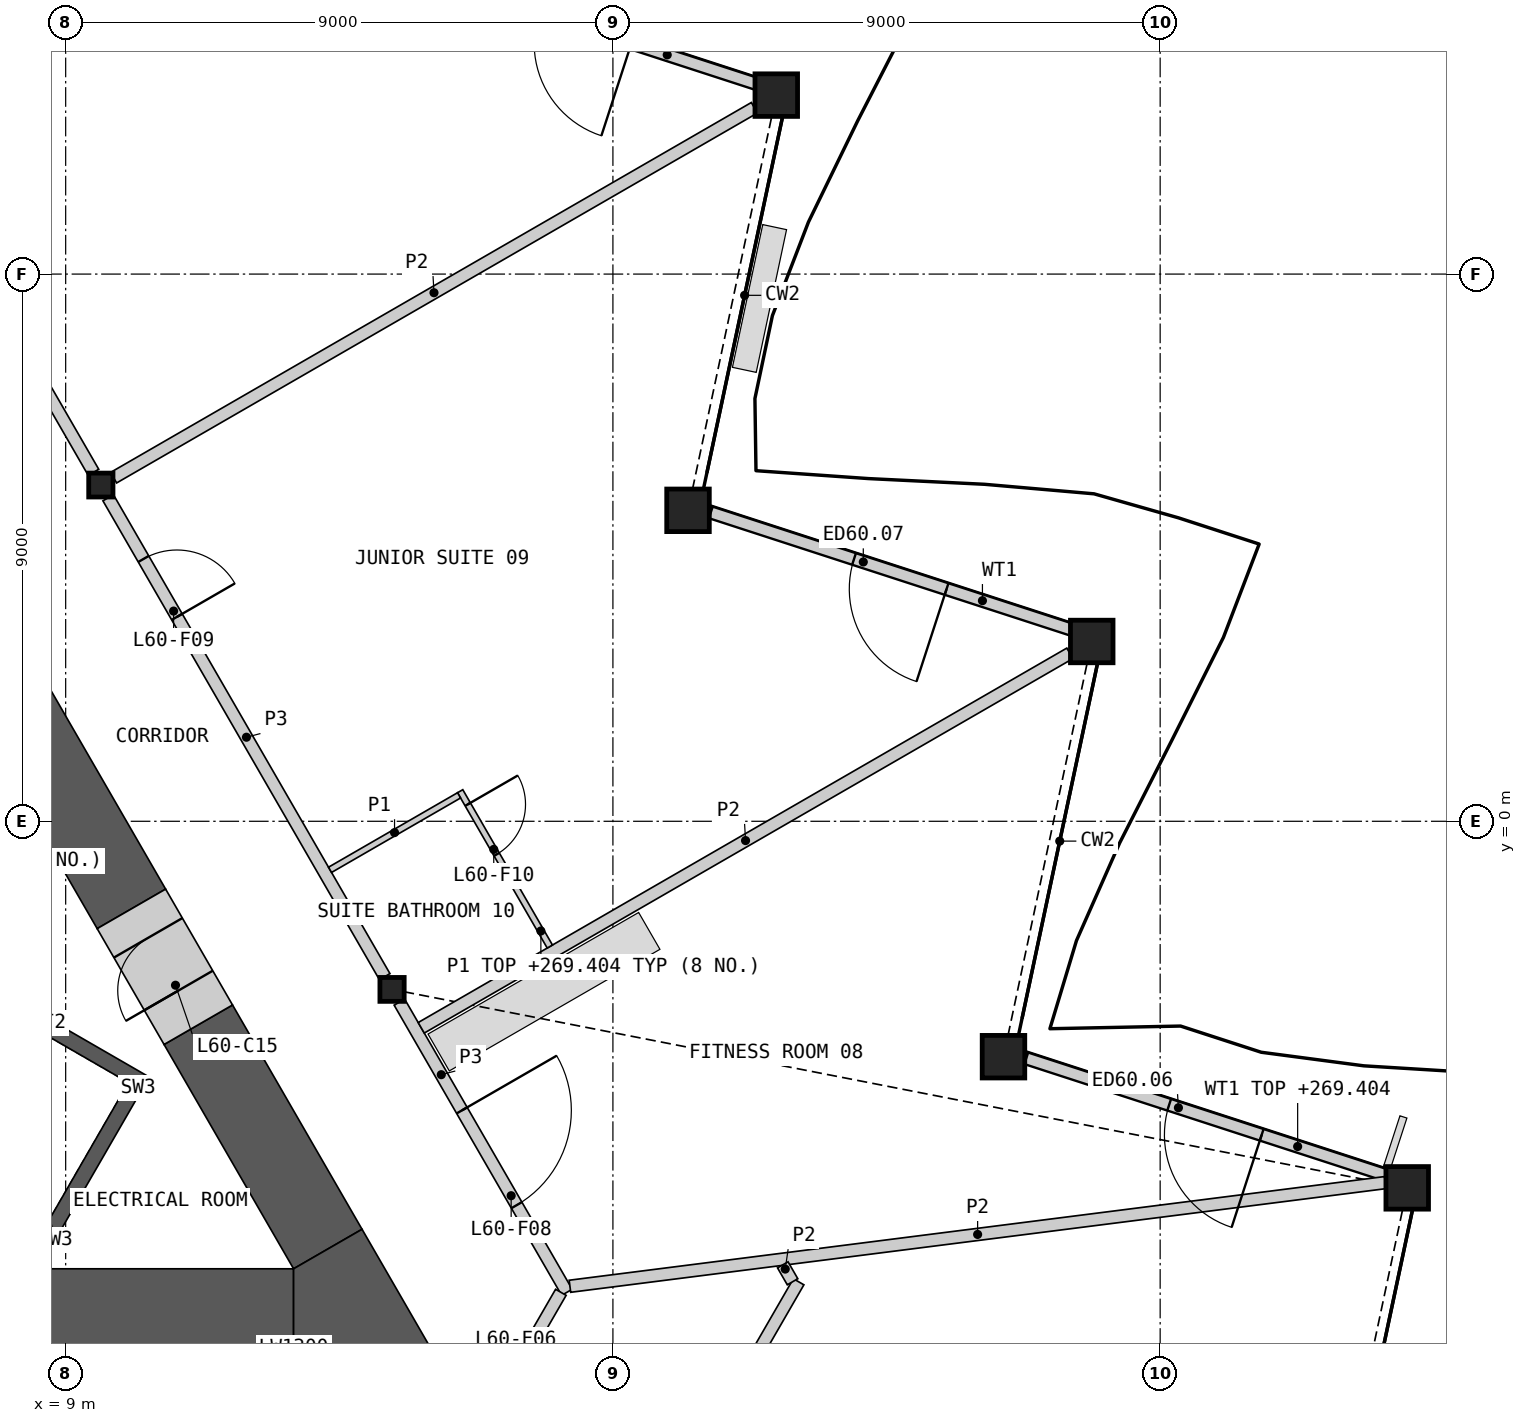
"""IFC4 building model, lengths in metres.
Left out: names, types, materials, properties, quantities, classifications, styles, units other than length and angle.
Written with IfcOpenShell. Run it as: python <this file> out.ifc"""

import sys

from ifc_helpers import new_model, si_unit, direction, frame, frame_2d, origin, origin_2d, place, context, subcontext, project, spatial, polyline, rectangle, hollow_rectangle, i_section, outline, extrude, element, fill, save


model = new_model("IFC4")
c1 = context("Model", 3, precision=1e-05, world=origin(), true_north=direction((0.0, 1.0)))
c2 = subcontext(c1, "Body", "Model", "MODEL_VIEW")
j1 = project(units=[si_unit("LENGTHUNIT", "METRE"), si_unit("PLANEANGLEUNIT", "RADIAN")], contexts=[c1])
p1 = place(None, origin())
s1 = spatial("IfcSite", under=j1, at=p1, CompositionType="ELEMENT")
p2 = place(p1, origin())
s2 = spatial("IfcBuilding", under=s1, at=p2, CompositionType="ELEMENT")
p3 = place(p2, frame((0.0, 0.0, 267.0)))
s3 = spatial("IfcBuildingStorey", under=s2, at=p3, CompositionType="ELEMENT", Elevation=267.0)
for number, where, z_axis, x_axis in (
    (1, (31.063, -6.029, 0.0), (0.0, 0.0, 1.0), (1.0, 0.0, 0.0)),
    (2, (24.423, -3.872, 0.0), (0.0, 0.0, 1.0), (1.0, 0.0, 0.0)),
    (3, (25.875, 2.957, 0.0), (0.0, 0.0, 1.0), (1.0, 0.0, 0.0)),
    (4, (19.235, 5.115, 0.0), (0.0, 0.0, 1.0), (1.0, 0.0, 0.0)),
    (5, (20.687, 11.943, 0.0), (0.0, 0.0, 1.0), (1.0, 0.0, 0.0)),
):
    element("IfcColumn", number, at=place(p3, frame(where, z_axis=z_axis, x_axis=x_axis)), inside=s3, PredefinedType="COLUMN", context=c2, shape_type="SweptSolid", body=[
        extrude(hollow_rectangle(XDim=0.7, YDim=0.7, WallThickness=0.045, at=origin_2d()), origin(), (0.0, 0.0, 1.0), 3.6),
    ])
for number, where, z_axis, x_axis in (
    (6, (14.368, -2.765, 0.0), (0.0, 0.0, 1.0), (1.0, 0.0, 0.0)),
    (7, (9.578, 5.53, 0.0), (0.0, 0.0, 1.0), (1.0, 0.0, 0.0)),
):
    element("IfcColumn", number, at=place(p3, frame(where, z_axis=z_axis, x_axis=x_axis)), inside=s3, PredefinedType="COLUMN", context=c2, shape_type="SweptSolid", body=[
        extrude(i_section(OverallWidth=0.399, OverallDepth=0.393, WebThickness=0.023, FlangeThickness=0.037, at=origin_2d()), origin(), (0.0, 0.0, 1.0), 3.6),
    ])
p4 = place(p3, frame((30.749, -5.832, 0.0), z_axis=(0.0, 0.0, 1.0), x_axis=(-0.95105557136, 0.309019902571, 0.0)))
e8 = element("IfcWall", 8, at=p4, inside=s3, PredefinedType="SOLIDWALL", context=c2, shape_type="SweptSolid", body=[
    extrude(rectangle(XDim=6.257, YDim=0.2, at=frame_2d((3.128, 0.0))), origin(), (0.0, 0.0, 1.0), 2.404),
])
p5 = place(p4, frame((2.186, 0.0, 0.0)))
e9 = element("IfcOpeningElement", 9, at=p5, cuts=e8, PredefinedType="OPENING", context=c2, shape_type="SweptSolid", body=[
    extrude(rectangle(XDim=1.6, YDim=2.4, at=frame_2d((0.8, 1.2))), frame((0.0, 0.11, 0.0), z_axis=(0.0, -1.0, 0.0), x_axis=(1.0, 0.0, 0.0)), (0.0, 0.0, 1.0), 0.22),
])
p6 = place(p3, frame((25.566, 3.145, 0.0), z_axis=(0.0, 0.0, 1.0), x_axis=(-0.951057270474, 0.309014673241, 0.0)))
e10 = element("IfcWall", 10, at=p6, inside=s3, PredefinedType="SOLIDWALL", context=c2, shape_type="SweptSolid", body=[
    extrude(rectangle(XDim=6.263, YDim=0.2, at=frame_2d((3.131, 0.0))), origin(), (0.0, 0.0, 1.0), 2.701),
])
p7 = place(p6, frame((2.186, 0.0, 0.0)))
e11 = element("IfcOpeningElement", 11, at=p7, cuts=e10, PredefinedType="OPENING", context=c2, shape_type="SweptSolid", body=[
    extrude(rectangle(XDim=1.6, YDim=2.4, at=frame_2d((0.8, 1.2))), frame((0.0, 0.11, 0.0), z_axis=(0.0, -1.0, 0.0), x_axis=(1.0, 0.0, 0.0)), (0.0, 0.0, 1.0), 0.22),
])
p8 = place(p3, frame((20.384, 12.121, 0.0), z_axis=(0.0, 0.0, 1.0), x_axis=(-0.951051239427, 0.309033234433, 0.0)))
e12 = element("IfcWall", 12, at=p8, inside=s3, PredefinedType="SOLIDWALL", context=c2, shape_type="SweptSolid", body=[
    extrude(rectangle(XDim=6.269, YDim=0.2, at=frame_2d((3.134, 0.0))), origin(), (0.0, 0.0, 1.0), 2.701),
])
p9 = place(p8, frame((2.186, 0.0, 0.0)))
e13 = element("IfcOpeningElement", 13, at=p9, cuts=e12, PredefinedType="OPENING", context=c2, shape_type="SweptSolid", body=[
    extrude(rectangle(XDim=1.6, YDim=2.4, at=frame_2d((0.8, 1.2))), frame((0.0, 0.11, 0.0), z_axis=(0.0, -1.0, 0.0), x_axis=(1.0, 0.0, 0.0)), (0.0, 0.0, 1.0), 0.22),
])
p10 = place(p3, origin())
e14 = element("IfcWall", 14, at=p10, inside=s3, PredefinedType="SHEAR", context=c2, shape_type="SweptSolid", body=[
    extrude(outline(polyline([(3.763, -3.956), (8.83, -6.881), (8.738, -6.539), (3.888, -3.739), (3.763, -3.956)])), origin(), (0.0, 0.0, 1.0), 3.25),
])
p11 = place(p3, origin())
e15 = element("IfcWall", 15, at=p11, inside=s3, PredefinedType="SHEAR", context=c2, shape_type="SweptSolid", body=[
    extrude(outline(polyline([(8.83, -6.881), (10.374, -4.206), (10.032, -4.298), (8.738, -6.539), (8.83, -6.881)])), origin(), (0.0, 0.0, 1.0), 3.25),
])
p12 = place(p3, origin())
e16 = element("IfcWall", 16, at=p12, inside=s3, PredefinedType="SHEAR", context=c2, shape_type="SweptSolid", body=[
    extrude(outline(polyline([(10.032, -4.298), (10.374, -4.206), (5.307, -1.281), (5.182, -1.498), (10.032, -4.298)])), origin(), (0.0, 0.0, 1.0), 3.25),
])
p13 = place(p3, frame((-12.748, -8.01, 0.0), z_axis=(0.0, 0.0, 1.0), x_axis=(1.0, 0.0, 0.0)))
e17 = element("IfcWall", 17, at=p13, inside=s3, PredefinedType="SHEAR", context=c2, shape_type="SweptSolid", body=[
    extrude(rectangle(XDim=25.497, YDim=1.3, at=frame_2d((12.748, 0.0))), origin(), (0.0, 0.0, 1.0), 3.25),
])
p14 = place(p3, frame((10.081, -1.441, 0.0), z_axis=(0.0, 0.0, 1.0), x_axis=(-0.500012180433, 0.866018371294, 0.0)))
e18 = element("IfcWall", 18, at=p14, inside=s3, PredefinedType="SHEAR", context=c2, shape_type="SweptSolid", body=[
    extrude(rectangle(XDim=15.05, YDim=1.3, at=frame_2d((7.525, 0.0))), origin(), (0.0, 0.0, 1.0), 3.25),
])
p15 = place(p3, frame((13.311, -7.035, 0.0), z_axis=(0.0, 0.0, 1.0), x_axis=(-0.500003555838, 0.866023350811, 0.0)))
e19 = element("IfcWall", 19, at=p15, inside=s3, PredefinedType="SHEAR", context=c2, shape_type="SweptSolid", body=[
    extrude(rectangle(XDim=4.26, YDim=1.3, at=frame_2d((2.13, 0.0))), origin(), (0.0, 0.0, 1.0), 3.25),
])
p16 = place(p3, origin())
e20 = element("IfcWall", 20, at=p16, inside=s3, PredefinedType="SHEAR", context=c2, shape_type="SweptSolid", body=[
    extrude(outline(polyline([(12.748, -8.66), (12.748, -7.36), (13.874, -6.71), (15.0, -8.66), (12.748, -8.66)])), origin(), (0.0, 0.0, 1.0), 3.25),
])
p17 = place(p3, frame((11.181, -3.346, 0.0), z_axis=(0.0, 0.0, 1.0), x_axis=(-0.499946605688, 0.86605622881, 0.0)))
e21 = element("IfcWall", 21, at=p17, inside=s3, PredefinedType="SHEAR", context=c2, shape_type="SweptSolid", body=[
    extrude(rectangle(XDim=2.2, YDim=1.3, at=frame_2d((1.1, 0.0))), origin(), (0.0, 0.0, 1.0), 3.25),
])
p18 = place(p17, frame((0.65, 0.0, 0.0)))
e22 = element("IfcOpeningElement", 22, at=p18, cuts=e21, PredefinedType="OPENING", context=c2, shape_type="SweptSolid", body=[
    extrude(rectangle(XDim=1.0, YDim=2.1, at=frame_2d((0.5, 1.05))), frame((0.0, 0.66, 0.0), z_axis=(0.0, -1.0, 0.0), x_axis=(1.0, 0.0, 0.0)), (0.0, 0.0, 1.0), 1.32),
])
p19 = place(p3, frame((9.699, 5.321, 0.0), z_axis=(0.0, 0.0, 1.0), x_axis=(0.49998193945, -0.866035830797, 0.0)))
e23 = element("IfcWall", 23, at=p19, inside=s3, PredefinedType="PARTITIONING", context=c2, shape_type="SweptSolid", body=[
    extrude(rectangle(XDim=9.094, YDim=0.2, at=frame_2d((4.547, 0.0))), origin(), (0.0, 0.0, 1.0), 3.25),
])
p20 = place(p19, frame((1.162, 0.0, 0.0)))
e24 = element("IfcOpeningElement", 24, at=p20, cuts=e23, PredefinedType="OPENING", context=c2, shape_type="SweptSolid", body=[
    extrude(rectangle(XDim=1.1, YDim=2.1, at=frame_2d((0.55, 1.05))), frame((0.0, 0.11, 0.0), z_axis=(0.0, -1.0, 0.0), x_axis=(1.0, 0.0, 0.0)), (0.0, 0.0, 1.0), 0.22),
])
p21 = place(p3, frame((4.91, 13.616, 0.0), z_axis=(0.0, 0.0, 1.0), x_axis=(0.50000207303, -0.866024206917, 0.0)))
e25 = element("IfcWall", 25, at=p21, inside=s3, PredefinedType="PARTITIONING", context=c2, shape_type="SweptSolid", body=[
    extrude(rectangle(XDim=9.095, YDim=0.2, at=frame_2d((4.547, 0.0))), origin(), (0.0, 0.0, 1.0), 3.25),
])
p22 = place(p21, frame((3.698, 0.0, 0.0)))
e26 = element("IfcOpeningElement", 26, at=p22, cuts=e25, PredefinedType="OPENING", context=c2, shape_type="SweptSolid", body=[
    extrude(rectangle(XDim=1.8, YDim=2.1, at=frame_2d((0.9, 1.05))), frame((0.0, 0.11, 0.0), z_axis=(0.0, -1.0, 0.0), x_axis=(1.0, 0.0, 0.0)), (0.0, 0.0, 1.0), 0.22),
])
p23 = place(p3, frame((14.489, -2.975, 0.0), z_axis=(0.0, 0.0, 1.0), x_axis=(0.500017753321, -0.866015153657, 0.0)))
e27 = element("IfcWall", 27, at=p23, inside=s3, PredefinedType="PARTITIONING", context=c2, shape_type="SweptSolid", body=[
    extrude(rectangle(XDim=5.51, YDim=0.2, at=frame_2d((2.755, 0.0))), origin(), (0.0, 0.0, 1.0), 3.25),
])
p24 = place(p23, frame((2.056, 0.0, 0.0)))
e28 = element("IfcOpeningElement", 28, at=p24, cuts=e27, PredefinedType="OPENING", context=c2, shape_type="SweptSolid", body=[
    extrude(rectangle(XDim=1.8, YDim=2.1, at=frame_2d((0.9, 1.05))), frame((0.0, 0.11, 0.0), z_axis=(0.0, -1.0, 0.0), x_axis=(1.0, 0.0, 0.0)), (0.0, 0.0, 1.0), 0.22),
])
p25 = place(p3, frame((15.281, -10.974, 0.0), z_axis=(0.0, 0.0, 1.0), x_axis=(0.499958791762, 0.866049194065, 0.0)))
e29 = element("IfcWall", 29, at=p25, inside=s3, PredefinedType="PARTITIONING", context=c2, shape_type="SweptSolid", body=[
    extrude(rectangle(XDim=3.726, YDim=0.2, at=frame_2d((1.863, 0.0))), origin(), (0.0, 0.0, 1.0), 3.25),
])
p26 = place(p25, frame((1.388, 0.0, 0.0)))
e30 = element("IfcOpeningElement", 30, at=p26, cuts=e29, PredefinedType="OPENING", context=c2, shape_type="SweptSolid", body=[
    extrude(rectangle(XDim=0.95, YDim=2.1, at=frame_2d((0.475, 1.05))), frame((0.0, 0.11, 0.0), z_axis=(0.0, -1.0, 0.0), x_axis=(1.0, 0.0, 0.0)), (0.0, 0.0, 1.0), 0.22),
])
p27 = place(p3, frame((17.293, -7.648, 0.0), z_axis=(0.0, 0.0, 1.0), x_axis=(0.992013080374, 0.126135040205, 0.0)))
e31 = element("IfcWall", 31, at=p27, inside=s3, PredefinedType="PARTITIONING", context=c2, shape_type="SweptSolid", body=[
    extrude(rectangle(XDim=13.518, YDim=0.2, at=frame_2d((6.759, 0.0))), origin(), (0.0, 0.0, 1.0), 2.404),
])
p28 = place(p3, frame((14.848, -3.396, 0.0), z_axis=(0.0, 0.0, 1.0), x_axis=(0.866026822589, 0.49999754255, 0.0)))
e32 = element("IfcWall", 32, at=p28, inside=s3, PredefinedType="PARTITIONING", context=c2, shape_type="SweptSolid", body=[
    extrude(rectangle(XDim=12.317, YDim=0.2, at=frame_2d((6.159, 0.0))), origin(), (0.0, 0.0, 1.0), 2.404),
])
p29 = place(p3, frame((9.788, 5.651, 0.0), z_axis=(0.0, 0.0, 1.0), x_axis=(0.866024549986, 0.50000147882, 0.0)))
e33 = element("IfcWall", 33, at=p29, inside=s3, PredefinedType="PARTITIONING", context=c2, shape_type="SweptSolid", body=[
    extrude(rectangle(XDim=12.169, YDim=0.2, at=frame_2d((6.084, 0.0))), origin(), (0.0, 0.0, 1.0), 2.404),
])
p30 = place(p3, frame((19.162, -10.851, 0.0), z_axis=(0.0, 0.0, 1.0), x_axis=(0.500011000363, 0.866019052629, 0.0)))
e34 = element("IfcWall", 34, at=p30, inside=s3, PredefinedType="PARTITIONING", context=c2, shape_type="SweptSolid", body=[
    extrude(rectangle(XDim=3.784, YDim=0.2, at=frame_2d((1.892, 0.0))), origin(), (0.0, 0.0, 1.0), 2.404),
])
p31 = place(p3, frame((20.794, -7.295, 0.0), z_axis=(0.0, 0.0, 1.0), x_axis=(0.499897828833, -0.8660843843, 0.0)))
e35 = element("IfcWall", 35, at=p31, inside=s3, PredefinedType="PARTITIONING", context=c2, shape_type="SweptSolid", body=[
    extrude(rectangle(XDim=0.321, YDim=0.2, at=frame_2d((0.161, 0.0))), origin(), (0.0, 0.0, 1.0), 2.404),
])
p32 = place(p3, frame((15.488, 0.495, 0.0), z_axis=(0.0, 0.0, 1.0), x_axis=(0.500037662692, -0.866003658127, 0.0)))
e36 = element("IfcWall", 36, at=p32, inside=s3, PredefinedType="PARTITIONING", context=c2, shape_type="SweptSolid", body=[
    extrude(rectangle(XDim=2.95, YDim=0.1, at=frame_2d((1.475, 0.0))), origin(), (0.0, 0.0, 1.0), 2.404),
])
p33 = place(p32, frame((0.25, 0.0, 0.0)))
e37 = element("IfcOpeningElement", 37, at=p33, cuts=e36, PredefinedType="OPENING", context=c2, shape_type="SweptSolid", body=[
    extrude(rectangle(XDim=0.95, YDim=2.1, at=frame_2d((0.475, 1.05))), frame((0.0, 0.06, 0.0), z_axis=(0.0, -1.0, 0.0), x_axis=(1.0, 0.0, 0.0)), (0.0, 0.0, 1.0), 0.12),
])
p34 = place(p3, frame((13.348, -0.799, 0.0), z_axis=(0.0, 0.0, 1.0), x_axis=(0.866014668023, 0.500018594424, 0.0)))
e38 = element("IfcWall", 38, at=p34, inside=s3, PredefinedType="PARTITIONING", context=c2, shape_type="SweptSolid", body=[
    extrude(rectangle(XDim=2.45, YDim=0.1, at=frame_2d((1.225, 0.0))), origin(), (0.0, 0.0, 1.0), 2.404),
])
p35 = place(p5, origin())
e39 = element("IfcDoor", 39, at=p35, inside=s3, OperationType="DOUBLE_DOOR_SINGLE_SWING", PredefinedType="DOOR", context=c2, shape_type="SweptSolid", body=[
    extrude(rectangle(XDim=1.6, YDim=2.4, at=frame_2d((0.8, 1.2))), frame((0.0, 0.025, 0.0), z_axis=(0.0, -1.0, 0.0), x_axis=(1.0, 0.0, 0.0)), (0.0, 0.0, 1.0), 0.05),
])
fill(e9, e39)
p36 = place(p7, origin())
e40 = element("IfcDoor", 40, at=p36, inside=s3, OperationType="DOUBLE_DOOR_SINGLE_SWING", PredefinedType="DOOR", context=c2, shape_type="SweptSolid", body=[
    extrude(rectangle(XDim=1.6, YDim=2.4, at=frame_2d((0.8, 1.2))), frame((0.0, 0.025, 0.0), z_axis=(0.0, -1.0, 0.0), x_axis=(1.0, 0.0, 0.0)), (0.0, 0.0, 1.0), 0.05),
])
fill(e11, e40)
p37 = place(p18, origin())
e41 = element("IfcDoor", 41, at=p37, inside=s3, OperationType="SINGLE_SWING_LEFT", PredefinedType="DOOR", context=c2, shape_type="SweptSolid", body=[
    extrude(rectangle(XDim=1.0, YDim=2.1, at=frame_2d((0.5, 1.05))), frame((0.0, 0.405, 0.0), z_axis=(0.0, -1.0, 0.0), x_axis=(1.0, 0.0, 0.0)), (0.0, 0.0, 1.0), 0.05),
])
fill(e22, e41)
p38 = place(p24, origin())
e42 = element("IfcDoor", 42, at=p38, inside=s3, OperationType="DOUBLE_DOOR_SINGLE_SWING", PredefinedType="DOOR", context=c2, shape_type="SweptSolid", body=[
    extrude(rectangle(XDim=1.8, YDim=2.1, at=frame_2d((0.9, 1.05))), frame((0.0, 0.025, 0.0), z_axis=(0.0, -1.0, 0.0), x_axis=(1.0, 0.0, 0.0)), (0.0, 0.0, 1.0), 0.05),
])
fill(e28, e42)
p39 = place(p20, origin())
e43 = element("IfcDoor", 43, at=p39, inside=s3, OperationType="SINGLE_SWING_RIGHT", PredefinedType="DOOR", context=c2, shape_type="SweptSolid", body=[
    extrude(rectangle(XDim=1.1, YDim=2.1, at=frame_2d((0.55, 1.05))), frame((0.0, 0.025, 0.0), z_axis=(0.0, -1.0, 0.0), x_axis=(1.0, 0.0, 0.0)), (0.0, 0.0, 1.0), 0.05),
])
fill(e24, e43)
p40 = place(p33, origin())
e44 = element("IfcDoor", 44, at=p40, inside=s3, OperationType="SINGLE_SWING_LEFT", PredefinedType="DOOR", context=c2, shape_type="SweptSolid", body=[
    extrude(rectangle(XDim=0.95, YDim=2.1, at=frame_2d((0.475, 1.05))), frame((0.0, 0.025, 0.0), z_axis=(0.0, -1.0, 0.0), x_axis=(1.0, 0.0, 0.0)), (0.0, 0.0, 1.0), 0.05),
])
fill(e37, e44)
save(model, sys.argv[1])
